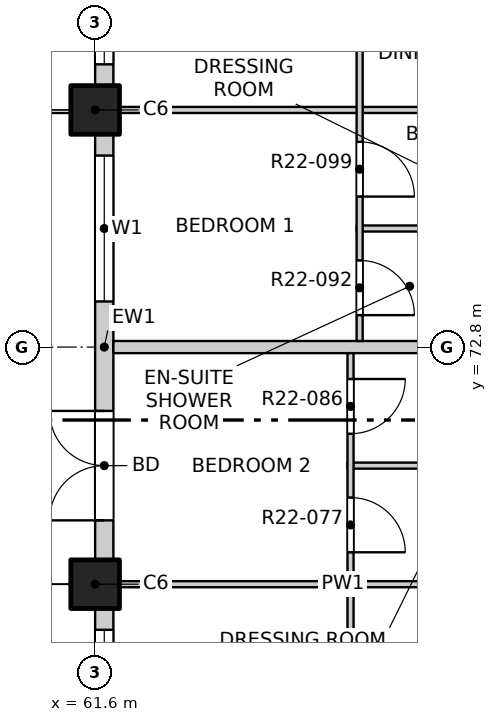
"""IFC4 building model, lengths in metres.
Left out: names, types, materials, properties, quantities, classifications, styles, units other than length and angle.
Written with IfcOpenShell. Run it as: python <this file> out.ifc"""

import sys

from ifc_helpers import new_model, si_unit, direction, frame, frame_2d, origin, origin_2d, place, context, subcontext, project, spatial, rectangle, extrude, element, fill, save


model = new_model("IFC4")
c1 = context("Model", 3, precision=1e-05, world=origin(), true_north=direction((0.0, 1.0)))
c2 = subcontext(c1, "Body", "Model", "MODEL_VIEW")
j1 = project(units=[si_unit("LENGTHUNIT", "METRE"), si_unit("PLANEANGLEUNIT", "RADIAN")], contexts=[c1])
p1 = place(None, origin())
s1 = spatial("IfcSite", under=j1, at=p1, CompositionType="ELEMENT")
p2 = place(p1, origin())
s2 = spatial("IfcBuilding", under=s1, at=p2, CompositionType="ELEMENT")
p3 = place(p2, frame((0.0, 0.0, 231.3)))
s3 = spatial("IfcBuildingStorey", under=s2, at=p3, CompositionType="ELEMENT", Elevation=231.3)
for number, where, z_axis, x_axis in (
    (1, (61.6, 68.9, -0.25), (0.0, 0.0, 1.0), (1.0, 0.0, 0.0)),
    (2, (61.6, 76.7, -0.25), (0.0, 0.0, 1.0), (1.0, 0.0, 0.0)),
):
    element("IfcColumn", number, at=place(p3, frame(where, z_axis=z_axis, x_axis=x_axis)), inside=s3, PredefinedType="COLUMN", context=c2, shape_type="SweptSolid", body=[
        extrude(rectangle(XDim=0.8, YDim=0.8, at=origin_2d()), origin(), (0.0, 0.0, 1.0), 3.4),
    ])
p4 = place(p3, frame((61.75, 61.5, 0.0), z_axis=(0.0, 0.0, 1.0), x_axis=(0.0, 1.0, 0.0)))
e3 = element("IfcWall", 3, at=p4, inside=s3, PredefinedType="SOLIDWALL", context=c2, shape_type="SweptSolid", body=[
    extrude(rectangle(XDim=7.0, YDim=0.3, at=frame_2d((3.5, 0.0))), origin(), (0.0, 0.0, 1.0), 2.7),
])
p5 = place(p4, frame((0.65, 0.0, 0.0)))
e4 = element("IfcOpeningElement", 4, at=p5, cuts=e3, PredefinedType="OPENING", context=c2, shape_type="SweptSolid", body=[
    extrude(rectangle(XDim=1.8, YDim=2.4, at=frame_2d((0.9, 1.2))), frame((0.0, 0.16, 0.0), z_axis=(0.0, -1.0, 0.0), x_axis=(1.0, 0.0, 0.0)), (0.0, 0.0, 1.0), 0.32),
])
p6 = place(p4, frame((4.25, 0.0, 0.9)))
e5 = element("IfcOpeningElement", 5, at=p6, cuts=e3, PredefinedType="OPENING", context=c2, shape_type="SweptSolid", body=[
    extrude(rectangle(XDim=2.4, YDim=1.8, at=frame_2d((1.2, 0.9))), frame((0.0, 0.16, 0.0), z_axis=(0.0, -1.0, 0.0), x_axis=(1.0, 0.0, 0.0)), (0.0, 0.0, 1.0), 0.32),
])
p7 = place(p3, frame((61.75, 69.3, 0.0), z_axis=(0.0, 0.0, 1.0), x_axis=(0.0, 1.0, 0.0)))
e6 = element("IfcWall", 6, at=p7, inside=s3, PredefinedType="SOLIDWALL", context=c2, shape_type="SweptSolid", body=[
    extrude(rectangle(XDim=7.0, YDim=0.3, at=frame_2d((3.5, 0.0))), origin(), (0.0, 0.0, 1.0), 2.7),
])
p8 = place(p7, frame((0.65, 0.0, 0.0)))
e7 = element("IfcOpeningElement", 7, at=p8, cuts=e6, PredefinedType="OPENING", context=c2, shape_type="SweptSolid", body=[
    extrude(rectangle(XDim=1.8, YDim=2.4, at=frame_2d((0.9, 1.2))), frame((0.0, 0.16, 0.0), z_axis=(0.0, -1.0, 0.0), x_axis=(1.0, 0.0, 0.0)), (0.0, 0.0, 1.0), 0.32),
])
p9 = place(p7, frame((4.25, 0.0, 0.9)))
e8 = element("IfcOpeningElement", 8, at=p9, cuts=e6, PredefinedType="OPENING", context=c2, shape_type="SweptSolid", body=[
    extrude(rectangle(XDim=2.4, YDim=1.8, at=frame_2d((1.2, 0.9))), frame((0.0, 0.16, 0.0), z_axis=(0.0, -1.0, 0.0), x_axis=(1.0, 0.0, 0.0)), (0.0, 0.0, 1.0), 0.32),
])
p10 = place(p3, frame((61.75, 77.1, 0.0), z_axis=(0.0, 0.0, 1.0), x_axis=(0.0, 1.0, 0.0)))
e9 = element("IfcWall", 9, at=p10, inside=s3, PredefinedType="SOLIDWALL", context=c2, shape_type="SweptSolid", body=[
    extrude(rectangle(XDim=7.4, YDim=0.3, at=frame_2d((3.7, 0.0))), origin(), (0.0, 0.0, 1.0), 2.7),
])
p11 = place(p10, frame((0.35, 0.0, 0.9)))
e10 = element("IfcOpeningElement", 10, at=p11, cuts=e9, PredefinedType="OPENING", context=c2, shape_type="SweptSolid", body=[
    extrude(rectangle(XDim=2.4, YDim=1.8, at=frame_2d((1.2, 0.9))), frame((0.0, 0.16, 0.0), z_axis=(0.0, -1.0, 0.0), x_axis=(1.0, 0.0, 0.0)), (0.0, 0.0, 1.0), 0.32),
])
p12 = place(p10, frame((4.25, 0.0, 0.9)))
e11 = element("IfcOpeningElement", 11, at=p12, cuts=e9, PredefinedType="OPENING", context=c2, shape_type="SweptSolid", body=[
    extrude(rectangle(XDim=2.4, YDim=1.8, at=frame_2d((1.2, 0.9))), frame((0.0, 0.16, 0.0), z_axis=(0.0, -1.0, 0.0), x_axis=(1.0, 0.0, 0.0)), (0.0, 0.0, 1.0), 0.32),
])
p13 = place(p3, frame((61.9, 68.9, 0.0), z_axis=(0.0, 0.0, 1.0), x_axis=(1.0, 0.0, 0.0)))
e12 = element("IfcWall", 12, at=p13, inside=s3, PredefinedType="PARTITIONING", context=c2, shape_type="SweptSolid", body=[
    extrude(rectangle(XDim=7.55, YDim=0.1, at=frame_2d((3.775, 0.0))), origin(), (0.0, 0.0, 1.0), 2.55),
])
p14 = place(p3, frame((65.75, 70.85, 0.0), z_axis=(0.0, 0.0, 1.0), x_axis=(1.0, 0.0, 0.0)))
e13 = element("IfcWall", 13, at=p14, inside=s3, PredefinedType="PARTITIONING", context=c2, shape_type="SweptSolid", body=[
    extrude(rectangle(XDim=3.7, YDim=0.1, at=frame_2d((1.85, 0.0))), origin(), (0.0, 0.0, 1.0), 3.15),
])
p15 = place(p3, frame((61.9, 72.8, 0.0), z_axis=(0.0, 0.0, 1.0), x_axis=(1.0, 0.0, 0.0)))
e14 = element("IfcWall", 14, at=p15, inside=s3, PredefinedType="PARTITIONING", context=c2, shape_type="SweptSolid", body=[
    extrude(rectangle(XDim=11.5, YDim=0.2, at=frame_2d((5.75, 0.0))), origin(), (0.0, 0.0, 1.0), 3.15),
])
p16 = place(p3, frame((65.9, 74.75, 0.0), z_axis=(0.0, 0.0, 1.0), x_axis=(1.0, 0.0, 0.0)))
e15 = element("IfcWall", 15, at=p16, inside=s3, PredefinedType="PARTITIONING", context=c2, shape_type="SweptSolid", body=[
    extrude(rectangle(XDim=3.55, YDim=0.1, at=frame_2d((1.775, 0.0))), origin(), (0.0, 0.0, 1.0), 3.15),
])
p17 = place(p3, frame((61.9, 76.7, 0.0), z_axis=(0.0, 0.0, 1.0), x_axis=(1.0, 0.0, 0.0)))
e16 = element("IfcWall", 16, at=p17, inside=s3, PredefinedType="PARTITIONING", context=c2, shape_type="SweptSolid", body=[
    extrude(rectangle(XDim=7.55, YDim=0.1, at=frame_2d((3.775, 0.0))), origin(), (0.0, 0.0, 1.0), 2.55),
])
p18 = place(p3, frame((65.8, 61.2, 0.0), z_axis=(0.0, 0.0, 1.0), x_axis=(0.0, 1.0, 0.0)))
e17 = element("IfcWall", 17, at=p18, inside=s3, PredefinedType="PARTITIONING", context=c2, shape_type="SweptSolid", body=[
    extrude(rectangle(XDim=11.5, YDim=0.1, at=frame_2d((5.75, 0.0))), origin(), (0.0, 0.0, 1.0), 3.15),
])
p19 = place(p18, frame((0.425, 0.0, 0.0)))
e18 = element("IfcOpeningElement", 18, at=p19, cuts=e17, PredefinedType="OPENING", context=c2, shape_type="SweptSolid", body=[
    extrude(rectangle(XDim=0.9, YDim=2.1, at=frame_2d((0.45, 1.05))), frame((0.0, 0.06, 0.0), z_axis=(0.0, -1.0, 0.0), x_axis=(1.0, 0.0, 0.0)), (0.0, 0.0, 1.0), 0.12),
])
p20 = place(p18, frame((2.375, 0.0, 0.0)))
e19 = element("IfcOpeningElement", 19, at=p20, cuts=e17, PredefinedType="OPENING", context=c2, shape_type="SweptSolid", body=[
    extrude(rectangle(XDim=0.9, YDim=2.1, at=frame_2d((0.45, 1.05))), frame((0.0, 0.06, 0.0), z_axis=(0.0, -1.0, 0.0), x_axis=(1.0, 0.0, 0.0)), (0.0, 0.0, 1.0), 0.12),
])
p21 = place(p18, frame((5.15, 0.0, 0.0)))
e20 = element("IfcOpeningElement", 20, at=p21, cuts=e17, PredefinedType="OPENING", context=c2, shape_type="SweptSolid", body=[
    extrude(rectangle(XDim=1.2, YDim=2.1, at=frame_2d((0.6, 1.05))), frame((0.0, 0.06, 0.0), z_axis=(0.0, -1.0, 0.0), x_axis=(1.0, 0.0, 0.0)), (0.0, 0.0, 1.0), 0.12),
])
p22 = place(p18, frame((8.225, 0.0, 0.0)))
e21 = element("IfcOpeningElement", 21, at=p22, cuts=e17, PredefinedType="OPENING", context=c2, shape_type="SweptSolid", body=[
    extrude(rectangle(XDim=0.9, YDim=2.1, at=frame_2d((0.45, 1.05))), frame((0.0, 0.06, 0.0), z_axis=(0.0, -1.0, 0.0), x_axis=(1.0, 0.0, 0.0)), (0.0, 0.0, 1.0), 0.12),
])
p23 = place(p18, frame((10.175, 0.0, 0.0)))
e22 = element("IfcOpeningElement", 22, at=p23, cuts=e17, PredefinedType="OPENING", context=c2, shape_type="SweptSolid", body=[
    extrude(rectangle(XDim=0.9, YDim=2.1, at=frame_2d((0.45, 1.05))), frame((0.0, 0.06, 0.0), z_axis=(0.0, -1.0, 0.0), x_axis=(1.0, 0.0, 0.0)), (0.0, 0.0, 1.0), 0.12),
])
p24 = place(p3, frame((65.95, 72.9, 0.0), z_axis=(0.0, 0.0, 1.0), x_axis=(0.0, 1.0, 0.0)))
e23 = element("IfcWall", 23, at=p24, inside=s3, PredefinedType="PARTITIONING", context=c2, shape_type="SweptSolid", body=[
    extrude(rectangle(XDim=15.2, YDim=0.1, at=frame_2d((7.6, 0.0))), origin(), (0.0, 0.0, 1.0), 3.15),
])
p25 = place(p24, frame((0.425, 0.0, 0.0)))
e24 = element("IfcOpeningElement", 24, at=p25, cuts=e23, PredefinedType="OPENING", context=c2, shape_type="SweptSolid", body=[
    extrude(rectangle(XDim=0.9, YDim=2.1, at=frame_2d((0.45, 1.05))), frame((0.0, 0.06, 0.0), z_axis=(0.0, -1.0, 0.0), x_axis=(1.0, 0.0, 0.0)), (0.0, 0.0, 1.0), 0.12),
])
p26 = place(p24, frame((2.375, 0.0, 0.0)))
e25 = element("IfcOpeningElement", 25, at=p26, cuts=e23, PredefinedType="OPENING", context=c2, shape_type="SweptSolid", body=[
    extrude(rectangle(XDim=0.9, YDim=2.1, at=frame_2d((0.45, 1.05))), frame((0.0, 0.06, 0.0), z_axis=(0.0, -1.0, 0.0), x_axis=(1.0, 0.0, 0.0)), (0.0, 0.0, 1.0), 0.12),
])
p27 = place(p24, frame((5.15, 0.0, 0.0)))
e26 = element("IfcOpeningElement", 26, at=p27, cuts=e23, PredefinedType="OPENING", context=c2, shape_type="SweptSolid", body=[
    extrude(rectangle(XDim=1.2, YDim=2.1, at=frame_2d((0.6, 1.05))), frame((0.0, 0.06, 0.0), z_axis=(0.0, -1.0, 0.0), x_axis=(1.0, 0.0, 0.0)), (0.0, 0.0, 1.0), 0.12),
])
p28 = place(p24, frame((8.225, 0.0, 0.0)))
e27 = element("IfcOpeningElement", 27, at=p28, cuts=e23, PredefinedType="OPENING", context=c2, shape_type="SweptSolid", body=[
    extrude(rectangle(XDim=0.9, YDim=2.1, at=frame_2d((0.45, 1.05))), frame((0.0, 0.06, 0.0), z_axis=(0.0, -1.0, 0.0), x_axis=(1.0, 0.0, 0.0)), (0.0, 0.0, 1.0), 0.12),
])
p29 = place(p24, frame((10.175, 0.0, 0.0)))
e28 = element("IfcOpeningElement", 28, at=p29, cuts=e23, PredefinedType="OPENING", context=c2, shape_type="SweptSolid", body=[
    extrude(rectangle(XDim=0.9, YDim=2.1, at=frame_2d((0.45, 1.05))), frame((0.0, 0.06, 0.0), z_axis=(0.0, -1.0, 0.0), x_axis=(1.0, 0.0, 0.0)), (0.0, 0.0, 1.0), 0.12),
])
p30 = place(p24, frame((12.95, 0.0, 0.0)))
e29 = element("IfcOpeningElement", 29, at=p30, cuts=e23, PredefinedType="OPENING", context=c2, shape_type="SweptSolid", body=[
    extrude(rectangle(XDim=1.2, YDim=2.1, at=frame_2d((0.6, 1.05))), frame((0.0, 0.06, 0.0), z_axis=(0.0, -1.0, 0.0), x_axis=(1.0, 0.0, 0.0)), (0.0, 0.0, 1.0), 0.12),
])
p31 = place(p6, origin())
e30 = element("IfcWindow", 30, at=p31, inside=s3, PartitioningType="DOUBLE_PANEL_VERTICAL", PredefinedType="WINDOW", context=c2, shape_type="SweptSolid", body=[
    extrude(rectangle(XDim=2.4, YDim=1.8, at=frame_2d((1.2, 0.9))), frame((0.0, 0.03, 0.0), z_axis=(0.0, -1.0, 0.0), x_axis=(1.0, 0.0, 0.0)), (0.0, 0.0, 1.0), 0.06),
])
fill(e5, e30)
p32 = place(p8, origin())
e31 = element("IfcDoor", 31, at=p32, inside=s3, OperationType="DOUBLE_DOOR_SINGLE_SWING", PredefinedType="DOOR", context=c2, shape_type="SweptSolid", body=[
    extrude(rectangle(XDim=1.8, YDim=2.4, at=frame_2d((0.9, 1.2))), frame((0.0, 0.025, 0.0), z_axis=(0.0, -1.0, 0.0), x_axis=(1.0, 0.0, 0.0)), (0.0, 0.0, 1.0), 0.05),
])
fill(e7, e31)
p33 = place(p9, origin())
e32 = element("IfcWindow", 32, at=p33, inside=s3, PartitioningType="DOUBLE_PANEL_VERTICAL", PredefinedType="WINDOW", context=c2, shape_type="SweptSolid", body=[
    extrude(rectangle(XDim=2.4, YDim=1.8, at=frame_2d((1.2, 0.9))), frame((0.0, 0.03, 0.0), z_axis=(0.0, -1.0, 0.0), x_axis=(1.0, 0.0, 0.0)), (0.0, 0.0, 1.0), 0.06),
])
fill(e8, e32)
p34 = place(p11, origin())
e33 = element("IfcWindow", 33, at=p34, inside=s3, PartitioningType="DOUBLE_PANEL_VERTICAL", PredefinedType="WINDOW", context=c2, shape_type="SweptSolid", body=[
    extrude(rectangle(XDim=2.4, YDim=1.8, at=frame_2d((1.2, 0.9))), frame((0.0, 0.03, 0.0), z_axis=(0.0, -1.0, 0.0), x_axis=(1.0, 0.0, 0.0)), (0.0, 0.0, 1.0), 0.06),
])
fill(e10, e33)
p35 = place(p22, origin())
e34 = element("IfcDoor", 34, at=p35, inside=s3, OperationType="SINGLE_SWING_RIGHT", PredefinedType="DOOR", context=c2, shape_type="SweptSolid", body=[
    extrude(rectangle(XDim=0.9, YDim=2.1, at=frame_2d((0.45, 1.05))), frame((0.0, 0.025, 0.0), z_axis=(0.0, -1.0, 0.0), x_axis=(1.0, 0.0, 0.0)), (0.0, 0.0, 1.0), 0.05),
])
fill(e21, e34)
p36 = place(p23, origin())
e35 = element("IfcDoor", 35, at=p36, inside=s3, OperationType="SINGLE_SWING_LEFT", PredefinedType="DOOR", context=c2, shape_type="SweptSolid", body=[
    extrude(rectangle(XDim=0.9, YDim=2.1, at=frame_2d((0.45, 1.05))), frame((0.0, 0.025, 0.0), z_axis=(0.0, -1.0, 0.0), x_axis=(1.0, 0.0, 0.0)), (0.0, 0.0, 1.0), 0.05),
])
fill(e22, e35)
p37 = place(p25, origin())
e36 = element("IfcDoor", 36, at=p37, inside=s3, OperationType="SINGLE_SWING_RIGHT", PredefinedType="DOOR", context=c2, shape_type="SweptSolid", body=[
    extrude(rectangle(XDim=0.9, YDim=2.1, at=frame_2d((0.45, 1.05))), frame((0.0, 0.025, 0.0), z_axis=(0.0, -1.0, 0.0), x_axis=(1.0, 0.0, 0.0)), (0.0, 0.0, 1.0), 0.05),
])
fill(e24, e36)
p38 = place(p26, origin())
e37 = element("IfcDoor", 37, at=p38, inside=s3, OperationType="SINGLE_SWING_RIGHT", PredefinedType="DOOR", context=c2, shape_type="SweptSolid", body=[
    extrude(rectangle(XDim=0.9, YDim=2.1, at=frame_2d((0.45, 1.05))), frame((0.0, 0.025, 0.0), z_axis=(0.0, -1.0, 0.0), x_axis=(1.0, 0.0, 0.0)), (0.0, 0.0, 1.0), 0.05),
])
fill(e25, e37)
save(model, sys.argv[1])
